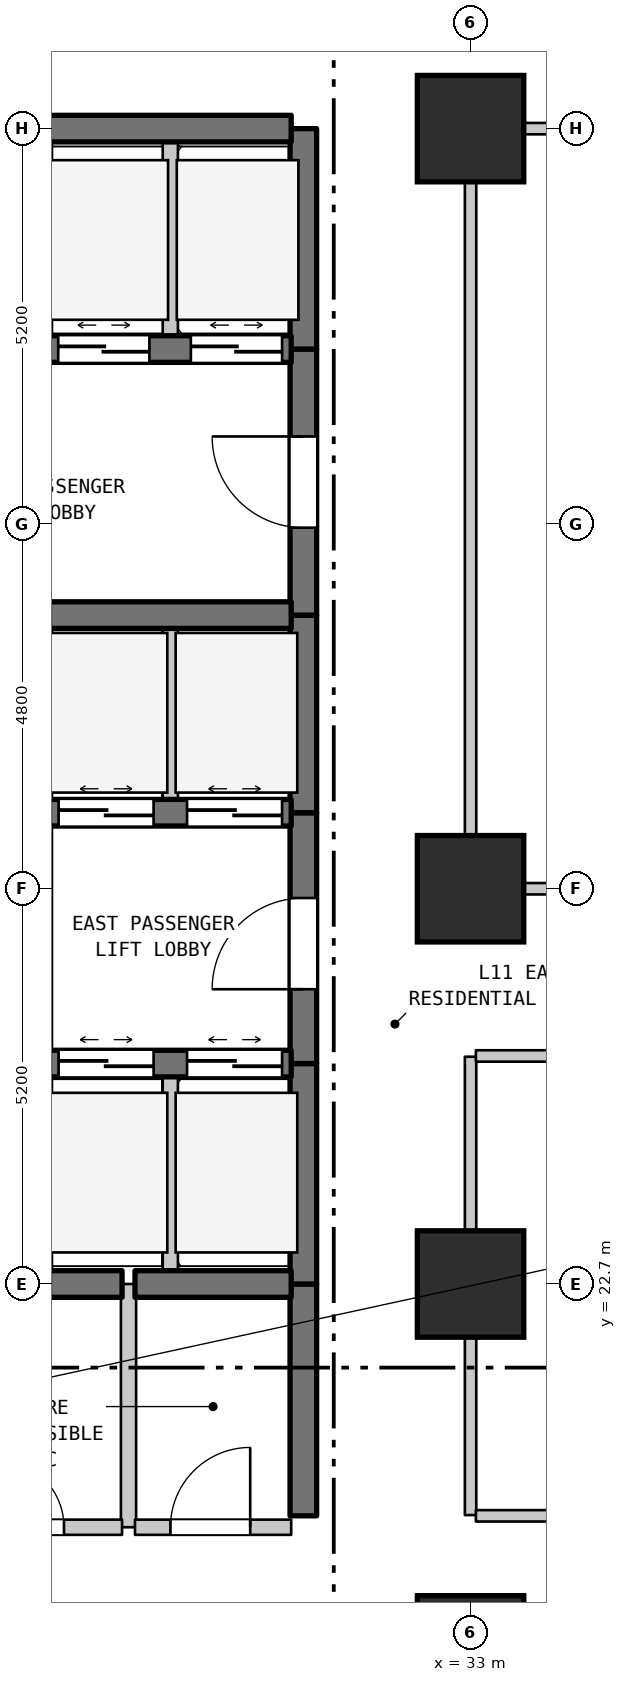
"""IFC4 building model, lengths in metres.
Left out: names, types, materials, properties, quantities, classifications, styles, units other than length and angle.
Written with IfcOpenShell. Run it as: python <this file> out.ifc"""

import sys

from ifc_helpers import new_model, si_unit, direction, frame, frame_2d, origin, origin_2d, place, context, subcontext, project, spatial, rectangle, extrude, element, fill, save


model = new_model("IFC4")
c1 = context("Model", 3, precision=1e-05, world=origin(), true_north=direction((0.0, 1.0)))
c2 = subcontext(c1, "Body", "Model", "MODEL_VIEW")
j1 = project(units=[si_unit("LENGTHUNIT", "METRE"), si_unit("PLANEANGLEUNIT", "RADIAN")], contexts=[c1])
p1 = place(None, origin())
s1 = spatial("IfcSite", under=j1, at=p1, CompositionType="ELEMENT")
p2 = place(p1, origin())
s2 = spatial("IfcBuilding", under=s1, at=p2, CompositionType="ELEMENT")
p3 = place(p2, frame((0.0, 0.0, 49.9)))
s3 = spatial("IfcBuildingStorey", under=s2, at=p3, CompositionType="ELEMENT", Elevation=49.9)
for number, where, z_axis, x_axis in (
    (1, (33.0, 17.9, 0.0), (0.0, 0.0, 1.0), (1.0, 0.0, 0.0)),
    (2, (33.0, 22.7, 0.0), (0.0, 0.0, 1.0), (1.0, 0.0, 0.0)),
    (3, (33.0, 27.9, 0.0), (0.0, 0.0, 1.0), (1.0, 0.0, 0.0)),
    (4, (33.0, 37.9, 0.0), (0.0, 0.0, 1.0), (1.0, 0.0, 0.0)),
):
    element("IfcColumn", number, at=place(p3, frame(where, z_axis=z_axis, x_axis=x_axis)), inside=s3, PredefinedType="COLUMN", context=c2, shape_type="SweptSolid", body=[
        extrude(rectangle(XDim=1.4, YDim=1.4, at=origin_2d()), origin(), (0.0, 0.0, 1.0), 3.7),
    ])
p4 = place(p3, frame((28.5, 19.5, 0.0), z_axis=(0.0, 0.0, 1.0), x_axis=(0.0, 1.0, 0.0)))
e5 = element("IfcWall", 5, at=p4, inside=s3, PredefinedType="STANDARD", context=c2, shape_type="SweptSolid", body=[
    extrude(rectangle(XDim=3.2, YDim=0.2, at=frame_2d((1.6, 0.0))), origin(), (0.0, 0.0, 1.0), 3.385),
])
p5 = place(p3, frame((29.05, 22.7, 0.0), z_axis=(0.0, 0.0, 1.0), x_axis=(0.0, 1.0, 0.0)))
e6 = element("IfcWall", 6, at=p5, inside=s3, PredefinedType="STANDARD", context=c2, shape_type="SweptSolid", body=[
    extrude(rectangle(XDim=2.9, YDim=0.2, at=frame_2d((1.45, 0.0))), origin(), (0.0, 0.0, 1.0), 3.385),
])
p6 = place(p3, frame((29.05, 28.9, 0.0), z_axis=(0.0, 0.0, 1.0), x_axis=(0.0, 1.0, 0.0)))
e7 = element("IfcWall", 7, at=p6, inside=s3, PredefinedType="STANDARD", context=c2, shape_type="SweptSolid", body=[
    extrude(rectangle(XDim=2.6, YDim=0.2, at=frame_2d((1.3, 0.0))), origin(), (0.0, 0.0, 1.0), 3.385),
])
p7 = place(p3, frame((29.05, 35.0, 0.0), z_axis=(0.0, 0.0, 1.0), x_axis=(0.0, 1.0, 0.0)))
e8 = element("IfcWall", 8, at=p7, inside=s3, PredefinedType="STANDARD", context=c2, shape_type="SweptSolid", body=[
    extrude(rectangle(XDim=2.9, YDim=0.2, at=frame_2d((1.45, 0.0))), origin(), (0.0, 0.0, 1.0), 3.385),
])
p8 = place(p3, frame((30.8, 19.65, 0.0), z_axis=(0.0, 0.0, 1.0), x_axis=(0.0, 1.0, 0.0)))
e9 = element("IfcWall", 9, at=p8, inside=s3, PredefinedType="SHEAR", context=c2, shape_type="SweptSolid", body=[
    extrude(rectangle(XDim=3.05, YDim=0.35, at=frame_2d((1.525, 0.0))), origin(), (0.0, 0.0, 1.0), 3.385),
])
p9 = place(p3, frame((30.8, 22.7, 0.0), z_axis=(0.0, 0.0, 1.0), x_axis=(0.0, 1.0, 0.0)))
e10 = element("IfcWall", 10, at=p9, inside=s3, PredefinedType="SHEAR", context=c2, shape_type="SweptSolid", body=[
    extrude(rectangle(XDim=2.9, YDim=0.35, at=frame_2d((1.45, 0.0))), origin(), (0.0, 0.0, 1.0), 3.385),
])
p10 = place(p3, frame((30.8, 25.6, 0.0), z_axis=(0.0, 0.0, 1.0), x_axis=(0.0, 1.0, 0.0)))
e11 = element("IfcWall", 11, at=p10, inside=s3, PredefinedType="SHEAR", context=c2, shape_type="SweptSolid", body=[
    extrude(rectangle(XDim=3.3, YDim=0.35, at=frame_2d((1.65, 0.0))), origin(), (0.0, 0.0, 1.0), 3.385),
])
p11 = place(p10, frame((0.978, 0.0, 0.0)))
e12 = element("IfcOpeningElement", 12, at=p11, cuts=e11, PredefinedType="OPENING", context=c2, shape_type="SweptSolid", body=[
    extrude(rectangle(XDim=1.2, YDim=2.2, at=frame_2d((0.6, 1.1))), frame((0.0, 0.185, 0.0), z_axis=(0.0, -1.0, 0.0), x_axis=(1.0, 0.0, 0.0)), (0.0, 0.0, 1.0), 0.37),
])
p12 = place(p3, frame((30.8, 28.9, 0.0), z_axis=(0.0, 0.0, 1.0), x_axis=(0.0, 1.0, 0.0)))
e13 = element("IfcWall", 13, at=p12, inside=s3, PredefinedType="SHEAR", context=c2, shape_type="SweptSolid", body=[
    extrude(rectangle(XDim=2.6, YDim=0.35, at=frame_2d((1.3, 0.0))), origin(), (0.0, 0.0, 1.0), 3.385),
])
p13 = place(p3, frame((30.8, 31.5, 0.0), z_axis=(0.0, 0.0, 1.0), x_axis=(0.0, 1.0, 0.0)))
e14 = element("IfcWall", 14, at=p13, inside=s3, PredefinedType="SHEAR", context=c2, shape_type="SweptSolid", body=[
    extrude(rectangle(XDim=3.5, YDim=0.35, at=frame_2d((1.75, 0.0))), origin(), (0.0, 0.0, 1.0), 3.385),
])
p14 = place(p13, frame((1.15, 0.0, 0.0)))
e15 = element("IfcOpeningElement", 15, at=p14, cuts=e14, PredefinedType="OPENING", context=c2, shape_type="SweptSolid", body=[
    extrude(rectangle(XDim=1.2, YDim=2.2, at=frame_2d((0.6, 1.1))), frame((0.0, 0.185, 0.0), z_axis=(0.0, -1.0, 0.0), x_axis=(1.0, 0.0, 0.0)), (0.0, 0.0, 1.0), 0.37),
])
p15 = place(p3, frame((30.8, 35.0, 0.0), z_axis=(0.0, 0.0, 1.0), x_axis=(0.0, 1.0, 0.0)))
e16 = element("IfcWall", 16, at=p15, inside=s3, PredefinedType="SHEAR", context=c2, shape_type="SweptSolid", body=[
    extrude(rectangle(XDim=2.9, YDim=0.35, at=frame_2d((1.45, 0.0))), origin(), (0.0, 0.0, 1.0), 3.385),
])
p16 = place(p3, frame((33.0, 19.66, 0.0), z_axis=(0.0, 0.0, 1.0), x_axis=(0.0, 1.0, 0.0)))
e17 = element("IfcWall", 17, at=p16, inside=s3, PredefinedType="STANDARD", context=c2, shape_type="SweptSolid", body=[
    extrude(rectangle(XDim=6.03, YDim=0.15, at=frame_2d((3.015, 0.0))), origin(), (0.0, 0.0, 1.0), 2.885),
])
p17 = place(p3, frame((33.0, 27.91, 0.0), z_axis=(0.0, 0.0, 1.0), x_axis=(0.0, 1.0, 0.0)))
e18 = element("IfcWall", 18, at=p17, inside=s3, PredefinedType="STANDARD", context=c2, shape_type="SweptSolid", body=[
    extrude(rectangle(XDim=9.98, YDim=0.15, at=frame_2d((4.99, 0.0))), origin(), (0.0, 0.0, 1.0), 2.885),
])
p18 = place(p3, frame((23.96, 19.5, 0.0), z_axis=(0.0, 0.0, 1.0), x_axis=(1.0, 0.0, 0.0)))
e19 = element("IfcWall", 19, at=p18, inside=s3, PredefinedType="STANDARD", context=c2, shape_type="SweptSolid", body=[
    extrude(rectangle(XDim=4.455, YDim=0.2, at=frame_2d((2.228, 0.0))), origin(), (0.0, 0.0, 1.0), 3.385),
])
p19 = place(p18, frame((0.665, 0.0, 0.0)))
e20 = element("IfcOpeningElement", 20, at=p19, cuts=e19, PredefinedType="OPENING", context=c2, shape_type="SweptSolid", body=[
    extrude(rectangle(XDim=0.9, YDim=2.15, at=frame_2d((0.45, 1.075))), frame((0.0, 0.11, 0.0), z_axis=(0.0, -1.0, 0.0), x_axis=(1.0, 0.0, 0.0)), (0.0, 0.0, 1.0), 0.22),
])
p20 = place(p18, frame((2.791, 0.0, 0.0)))
e21 = element("IfcOpeningElement", 21, at=p20, cuts=e19, PredefinedType="OPENING", context=c2, shape_type="SweptSolid", body=[
    extrude(rectangle(XDim=0.9, YDim=2.15, at=frame_2d((0.45, 1.075))), frame((0.0, 0.11, 0.0), z_axis=(0.0, -1.0, 0.0), x_axis=(1.0, 0.0, 0.0)), (0.0, 0.0, 1.0), 0.22),
])
p21 = place(p3, frame((28.585, 19.5, 0.0), z_axis=(0.0, 0.0, 1.0), x_axis=(1.0, 0.0, 0.0)))
e22 = element("IfcWall", 22, at=p21, inside=s3, PredefinedType="STANDARD", context=c2, shape_type="SweptSolid", body=[
    extrude(rectangle(XDim=2.055, YDim=0.2, at=frame_2d((1.027, 0.0))), origin(), (0.0, 0.0, 1.0), 3.385),
])
p22 = place(p21, frame((0.466, 0.0, 0.0)))
e23 = element("IfcOpeningElement", 23, at=p22, cuts=e22, PredefinedType="OPENING", context=c2, shape_type="SweptSolid", body=[
    extrude(rectangle(XDim=1.05, YDim=2.15, at=frame_2d((0.525, 1.075))), frame((0.0, 0.11, 0.0), z_axis=(0.0, -1.0, 0.0), x_axis=(1.0, 0.0, 0.0)), (0.0, 0.0, 1.0), 0.22),
])
p23 = place(p3, frame((33.07, 19.65, 0.0), z_axis=(0.0, 0.0, 1.0), x_axis=(1.0, 0.0, 0.0)))
e24 = element("IfcWall", 24, at=p23, inside=s3, PredefinedType="STANDARD", context=c2, shape_type="SweptSolid", body=[
    extrude(rectangle(XDim=33.27, YDim=0.15, at=frame_2d((16.635, 0.0))), origin(), (0.0, 0.0, 1.0), 3.385),
])
p24 = place(p23, frame((16.065, 0.0, 0.0)))
e25 = element("IfcOpeningElement", 25, at=p24, cuts=e24, PredefinedType="OPENING", context=c2, shape_type="SweptSolid", body=[
    extrude(rectangle(XDim=1.0, YDim=2.15, at=frame_2d((0.5, 1.075))), frame((0.0, 0.085, 0.0), z_axis=(0.0, -1.0, 0.0), x_axis=(1.0, 0.0, 0.0)), (0.0, 0.0, 1.0), 0.17),
])
p25 = place(p3, frame((27.46, 22.7, 0.0), z_axis=(0.0, 0.0, 1.0), x_axis=(1.0, 0.0, 0.0)))
e26 = element("IfcWall", 26, at=p25, inside=s3, PredefinedType="SHEAR", context=c2, shape_type="SweptSolid", body=[
    extrude(rectangle(XDim=0.955, YDim=0.35, at=frame_2d((0.478, 0.0))), origin(), (0.0, 0.0, 1.0), 3.385),
])
p26 = place(p3, frame((28.585, 22.7, 0.0), z_axis=(0.0, 0.0, 1.0), x_axis=(1.0, 0.0, 0.0)))
e27 = element("IfcWall", 27, at=p26, inside=s3, PredefinedType="SHEAR", context=c2, shape_type="SweptSolid", body=[
    extrude(rectangle(XDim=2.055, YDim=0.35, at=frame_2d((1.027, 0.0))), origin(), (0.0, 0.0, 1.0), 3.385),
])
p27 = place(p3, frame((27.46, 25.6, 0.0), z_axis=(0.0, 0.0, 1.0), x_axis=(1.0, 0.0, 0.0)))
e28 = element("IfcWall", 28, at=p27, inside=s3, PredefinedType="SHEAR", context=c2, shape_type="SweptSolid", body=[
    extrude(rectangle(XDim=3.18, YDim=0.35, at=frame_2d((1.59, 0.0))), origin(), (0.0, 0.0, 1.0), 3.385),
])
p28 = place(p27, frame((0.12, 0.0, 0.0)))
e29 = element("IfcOpeningElement", 29, at=p28, cuts=e28, PredefinedType="OPENING", context=c2, shape_type="SweptSolid", body=[
    extrude(rectangle(XDim=1.25, YDim=2.2, at=frame_2d((0.625, 1.1))), frame((0.0, 0.185, 0.0), z_axis=(0.0, -1.0, 0.0), x_axis=(1.0, 0.0, 0.0)), (0.0, 0.0, 1.0), 0.37),
])
p29 = place(p27, frame((1.81, 0.0, 0.0)))
e30 = element("IfcOpeningElement", 30, at=p29, cuts=e28, PredefinedType="OPENING", context=c2, shape_type="SweptSolid", body=[
    extrude(rectangle(XDim=1.25, YDim=2.2, at=frame_2d((0.625, 1.1))), frame((0.0, 0.185, 0.0), z_axis=(0.0, -1.0, 0.0), x_axis=(1.0, 0.0, 0.0)), (0.0, 0.0, 1.0), 0.37),
])
p30 = place(p3, frame((33.07, 25.7, 0.0), z_axis=(0.0, 0.0, 1.0), x_axis=(1.0, 0.0, 0.0)))
e31 = element("IfcWall", 31, at=p30, inside=s3, PredefinedType="STANDARD", context=c2, shape_type="SweptSolid", body=[
    extrude(rectangle(XDim=30.87, YDim=0.15, at=frame_2d((15.435, 0.0))), origin(), (0.0, 0.0, 1.0), 3.385),
])
p31 = place(p3, frame((33.07, 27.9, 0.0), z_axis=(0.0, 0.0, 1.0), x_axis=(1.0, 0.0, 0.0)))
e32 = element("IfcWall", 32, at=p31, inside=s3, PredefinedType="STANDARD", context=c2, shape_type="SweptSolid", body=[
    extrude(rectangle(XDim=30.87, YDim=0.15, at=frame_2d((15.435, 0.0))), origin(), (0.0, 0.0, 1.0), 2.885),
])
p32 = place(p31, frame((14.935, 0.0, 0.0)))
e33 = element("IfcOpeningElement", 33, at=p32, cuts=e32, PredefinedType="OPENING", context=c2, shape_type="SweptSolid", body=[
    extrude(rectangle(XDim=1.0, YDim=2.15, at=frame_2d((0.5, 1.075))), frame((0.0, 0.085, 0.0), z_axis=(0.0, -1.0, 0.0), x_axis=(1.0, 0.0, 0.0)), (0.0, 0.0, 1.0), 0.17),
])
p33 = place(p3, frame((27.46, 28.9, 0.0), z_axis=(0.0, 0.0, 1.0), x_axis=(1.0, 0.0, 0.0)))
e34 = element("IfcWall", 34, at=p33, inside=s3, PredefinedType="SHEAR", context=c2, shape_type="SweptSolid", body=[
    extrude(rectangle(XDim=3.18, YDim=0.35, at=frame_2d((1.59, 0.0))), origin(), (0.0, 0.0, 1.0), 3.385),
])
p34 = place(p33, frame((0.12, 0.0, 0.0)))
e35 = element("IfcOpeningElement", 35, at=p34, cuts=e34, PredefinedType="OPENING", context=c2, shape_type="SweptSolid", body=[
    extrude(rectangle(XDim=1.25, YDim=2.2, at=frame_2d((0.625, 1.1))), frame((0.0, 0.185, 0.0), z_axis=(0.0, -1.0, 0.0), x_axis=(1.0, 0.0, 0.0)), (0.0, 0.0, 1.0), 0.37),
])
p35 = place(p33, frame((1.81, 0.0, 0.0)))
e36 = element("IfcOpeningElement", 36, at=p35, cuts=e34, PredefinedType="OPENING", context=c2, shape_type="SweptSolid", body=[
    extrude(rectangle(XDim=1.25, YDim=2.2, at=frame_2d((0.625, 1.1))), frame((0.0, 0.185, 0.0), z_axis=(0.0, -1.0, 0.0), x_axis=(1.0, 0.0, 0.0)), (0.0, 0.0, 1.0), 0.37),
])
p36 = place(p3, frame((27.46, 31.5, 0.0), z_axis=(0.0, 0.0, 1.0), x_axis=(1.0, 0.0, 0.0)))
e37 = element("IfcWall", 37, at=p36, inside=s3, PredefinedType="SHEAR", context=c2, shape_type="SweptSolid", body=[
    extrude(rectangle(XDim=3.18, YDim=0.35, at=frame_2d((1.59, 0.0))), origin(), (0.0, 0.0, 1.0), 3.385),
])
p37 = place(p3, frame((19.16, 35.0, 0.0), z_axis=(0.0, 0.0, 1.0), x_axis=(1.0, 0.0, 0.0)))
e38 = element("IfcWall", 38, at=p37, inside=s3, PredefinedType="SHEAR", context=c2, shape_type="SweptSolid", body=[
    extrude(rectangle(XDim=11.48, YDim=0.35, at=frame_2d((5.74, 0.0))), origin(), (0.0, 0.0, 1.0), 3.385),
])
p38 = place(p37, frame((0.365, 0.0, 0.0)))
e39 = element("IfcOpeningElement", 39, at=p38, cuts=e38, PredefinedType="OPENING", context=c2, shape_type="SweptSolid", body=[
    extrude(rectangle(XDim=1.35, YDim=2.2, at=frame_2d((0.675, 1.1))), frame((0.0, 0.185, 0.0), z_axis=(0.0, -1.0, 0.0), x_axis=(1.0, 0.0, 0.0)), (0.0, 0.0, 1.0), 0.37),
])
p39 = place(p37, frame((2.765, 0.0, 0.0)))
e40 = element("IfcOpeningElement", 40, at=p39, cuts=e38, PredefinedType="OPENING", context=c2, shape_type="SweptSolid", body=[
    extrude(rectangle(XDim=1.35, YDim=2.2, at=frame_2d((0.675, 1.1))), frame((0.0, 0.185, 0.0), z_axis=(0.0, -1.0, 0.0), x_axis=(1.0, 0.0, 0.0)), (0.0, 0.0, 1.0), 0.37),
])
p40 = place(p37, frame((4.915, 0.0, 0.0)))
e41 = element("IfcOpeningElement", 41, at=p40, cuts=e38, PredefinedType="OPENING", context=c2, shape_type="SweptSolid", body=[
    extrude(rectangle(XDim=1.2, YDim=2.2, at=frame_2d((0.6, 1.1))), frame((0.0, 0.185, 0.0), z_axis=(0.0, -1.0, 0.0), x_axis=(1.0, 0.0, 0.0)), (0.0, 0.0, 1.0), 0.37),
])
p41 = place(p37, frame((6.665, 0.0, 0.0)))
e42 = element("IfcOpeningElement", 42, at=p41, cuts=e38, PredefinedType="OPENING", context=c2, shape_type="SweptSolid", body=[
    extrude(rectangle(XDim=1.2, YDim=2.2, at=frame_2d((0.6, 1.1))), frame((0.0, 0.185, 0.0), z_axis=(0.0, -1.0, 0.0), x_axis=(1.0, 0.0, 0.0)), (0.0, 0.0, 1.0), 0.37),
])
p42 = place(p37, frame((8.415, 0.0, 0.0)))
e43 = element("IfcOpeningElement", 43, at=p42, cuts=e38, PredefinedType="OPENING", context=c2, shape_type="SweptSolid", body=[
    extrude(rectangle(XDim=1.2, YDim=2.2, at=frame_2d((0.6, 1.1))), frame((0.0, 0.185, 0.0), z_axis=(0.0, -1.0, 0.0), x_axis=(1.0, 0.0, 0.0)), (0.0, 0.0, 1.0), 0.37),
])
p43 = place(p37, frame((10.16, 0.0, 0.0)))
e44 = element("IfcOpeningElement", 44, at=p43, cuts=e38, PredefinedType="OPENING", context=c2, shape_type="SweptSolid", body=[
    extrude(rectangle(XDim=1.2, YDim=2.2, at=frame_2d((0.6, 1.1))), frame((0.0, 0.185, 0.0), z_axis=(0.0, -1.0, 0.0), x_axis=(1.0, 0.0, 0.0)), (0.0, 0.0, 1.0), 0.37),
])
p44 = place(p3, frame((19.16, 37.9, 0.0), z_axis=(0.0, 0.0, 1.0), x_axis=(1.0, 0.0, 0.0)))
e45 = element("IfcWall", 45, at=p44, inside=s3, PredefinedType="SHEAR", context=c2, shape_type="SweptSolid", body=[
    extrude(rectangle(XDim=11.48, YDim=0.35, at=frame_2d((5.74, 0.0))), origin(), (0.0, 0.0, 1.0), 3.385),
])
p45 = place(p3, frame((33.07, 37.9, 0.0), z_axis=(0.0, 0.0, 1.0), x_axis=(1.0, 0.0, 0.0)))
e46 = element("IfcWall", 46, at=p45, inside=s3, PredefinedType="STANDARD", context=c2, shape_type="SweptSolid", body=[
    extrude(rectangle(XDim=26.935, YDim=0.15, at=frame_2d((13.467, 0.0))), origin(), (0.0, 0.0, 1.0), 3.385),
])
p46 = place(p11, origin())
e47 = element("IfcDoor", 47, at=p46, inside=s3, OperationType="SINGLE_SWING_LEFT", PredefinedType="DOOR", context=c2, shape_type="SweptSolid", body=[
    extrude(rectangle(XDim=1.2, YDim=2.2, at=frame_2d((0.6, 1.1))), frame((0.0, 0.025, 0.0), z_axis=(0.0, -1.0, 0.0), x_axis=(1.0, 0.0, 0.0)), (0.0, 0.0, 1.0), 0.05),
])
fill(e12, e47)
p47 = place(p14, origin())
e48 = element("IfcDoor", 48, at=p47, inside=s3, OperationType="SINGLE_SWING_RIGHT", PredefinedType="DOOR", context=c2, shape_type="SweptSolid", body=[
    extrude(rectangle(XDim=1.2, YDim=2.2, at=frame_2d((0.6, 1.1))), frame((0.0, 0.025, 0.0), z_axis=(0.0, -1.0, 0.0), x_axis=(1.0, 0.0, 0.0)), (0.0, 0.0, 1.0), 0.05),
])
fill(e15, e48)
p48 = place(p20, origin())
e49 = element("IfcDoor", 49, at=p48, inside=s3, OperationType="SINGLE_SWING_LEFT", PredefinedType="DOOR", context=c2, shape_type="SweptSolid", body=[
    extrude(rectangle(XDim=0.9, YDim=2.15, at=frame_2d((0.45, 1.075))), frame((0.0, 0.025, 0.0), z_axis=(0.0, -1.0, 0.0), x_axis=(1.0, 0.0, 0.0)), (0.0, 0.0, 1.0), 0.05),
])
fill(e21, e49)
p49 = place(p22, origin())
e50 = element("IfcDoor", 50, at=p49, inside=s3, OperationType="SINGLE_SWING_RIGHT", PredefinedType="DOOR", context=c2, shape_type="SweptSolid", body=[
    extrude(rectangle(XDim=1.05, YDim=2.15, at=frame_2d((0.525, 1.075))), frame((0.0, 0.025, 0.0), z_axis=(0.0, -1.0, 0.0), x_axis=(1.0, 0.0, 0.0)), (0.0, 0.0, 1.0), 0.05),
])
fill(e23, e50)
p50 = place(p28, origin())
e51 = element("IfcDoor", 51, at=p50, inside=s3, OperationType="DOUBLE_DOOR_SLIDING", PredefinedType="DOOR", context=c2, shape_type="SweptSolid", body=[
    extrude(rectangle(XDim=1.25, YDim=2.2, at=frame_2d((0.625, 1.1))), frame((0.0, 0.025, 0.0), z_axis=(0.0, -1.0, 0.0), x_axis=(1.0, 0.0, 0.0)), (0.0, 0.0, 1.0), 0.05),
])
fill(e29, e51)
p51 = place(p29, origin())
e52 = element("IfcDoor", 52, at=p51, inside=s3, OperationType="DOUBLE_DOOR_SLIDING", PredefinedType="DOOR", context=c2, shape_type="SweptSolid", body=[
    extrude(rectangle(XDim=1.25, YDim=2.2, at=frame_2d((0.625, 1.1))), frame((0.0, 0.025, 0.0), z_axis=(0.0, -1.0, 0.0), x_axis=(1.0, 0.0, 0.0)), (0.0, 0.0, 1.0), 0.05),
])
fill(e30, e52)
p52 = place(p34, origin())
e53 = element("IfcDoor", 53, at=p52, inside=s3, OperationType="DOUBLE_DOOR_SLIDING", PredefinedType="DOOR", context=c2, shape_type="SweptSolid", body=[
    extrude(rectangle(XDim=1.25, YDim=2.2, at=frame_2d((0.625, 1.1))), frame((0.0, 0.025, 0.0), z_axis=(0.0, -1.0, 0.0), x_axis=(1.0, 0.0, 0.0)), (0.0, 0.0, 1.0), 0.05),
])
fill(e35, e53)
p53 = place(p35, origin())
e54 = element("IfcDoor", 54, at=p53, inside=s3, OperationType="DOUBLE_DOOR_SLIDING", PredefinedType="DOOR", context=c2, shape_type="SweptSolid", body=[
    extrude(rectangle(XDim=1.25, YDim=2.2, at=frame_2d((0.625, 1.1))), frame((0.0, 0.025, 0.0), z_axis=(0.0, -1.0, 0.0), x_axis=(1.0, 0.0, 0.0)), (0.0, 0.0, 1.0), 0.05),
])
fill(e36, e54)
p54 = place(p42, origin())
e55 = element("IfcDoor", 55, at=p54, inside=s3, OperationType="DOUBLE_DOOR_SLIDING", PredefinedType="DOOR", context=c2, shape_type="SweptSolid", body=[
    extrude(rectangle(XDim=1.2, YDim=2.2, at=frame_2d((0.6, 1.1))), frame((0.0, 0.025, 0.0), z_axis=(0.0, -1.0, 0.0), x_axis=(1.0, 0.0, 0.0)), (0.0, 0.0, 1.0), 0.05),
])
fill(e43, e55)
p55 = place(p43, origin())
e56 = element("IfcDoor", 56, at=p55, inside=s3, OperationType="DOUBLE_DOOR_SLIDING", PredefinedType="DOOR", context=c2, shape_type="SweptSolid", body=[
    extrude(rectangle(XDim=1.2, YDim=2.2, at=frame_2d((0.6, 1.1))), frame((0.0, 0.025, 0.0), z_axis=(0.0, -1.0, 0.0), x_axis=(1.0, 0.0, 0.0)), (0.0, 0.0, 1.0), 0.05),
])
fill(e44, e56)
save(model, sys.argv[1])
